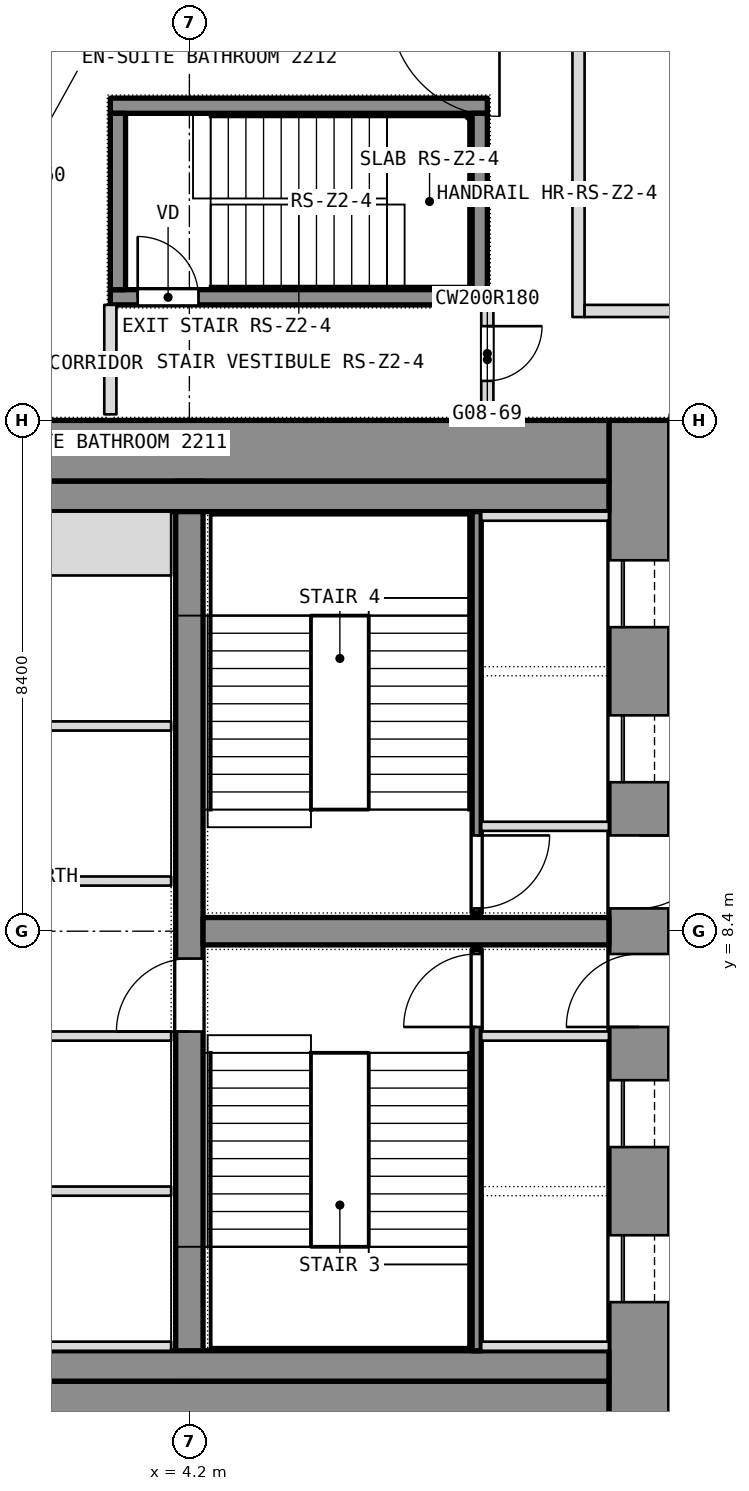
"""IFC4 building model, lengths in metres.
Left out: names, types, materials, properties, quantities, classifications, styles, units other than length and angle.
Written with IfcOpenShell. Run it as: python <this file> out.ifc"""

import sys

from ifc_helpers import new_model, si_unit, direction, frame, frame_2d, origin, place, context, subcontext, project, spatial, rectangle, extrude, element, fill, save


model = new_model("IFC4")
c1 = context("Model", 3, precision=1e-05, world=origin(), true_north=direction((0.0, 1.0)))
c2 = subcontext(c1, "Body", "Model", "MODEL_VIEW")
j1 = project(units=[si_unit("LENGTHUNIT", "METRE"), si_unit("PLANEANGLEUNIT", "RADIAN")], contexts=[c1])
p1 = place(None, origin())
s1 = spatial("IfcSite", under=j1, at=p1, CompositionType="ELEMENT")
p2 = place(p1, origin())
s2 = spatial("IfcBuilding", under=s1, at=p2, CompositionType="ELEMENT")
p3 = place(p2, frame((0.0, 0.0, 104.9)))
s3 = spatial("IfcBuildingStorey", under=s2, at=p3, CompositionType="ELEMENT", Elevation=104.9)
p4 = place(p3, frame((11.6, 0.0, 0.0), z_axis=(0.0, 0.0, 1.0), x_axis=(0.0, 1.0, 0.0)))
e1 = element("IfcWall", 1, at=p4, inside=s3, PredefinedType="SHEAR", context=c2, shape_type="SweptSolid", body=[
    extrude(rectangle(XDim=16.8, YDim=1.0, at=frame_2d((8.4, 0.0))), origin(), (0.0, 0.0, 1.0), 3.6),
])
p5 = place(p4, frame((2.3, 0.0, 0.0)))
e2 = element("IfcOpeningElement", 2, at=p5, cuts=e1, PredefinedType="OPENING", context=c2, shape_type="SweptSolid", body=[
    extrude(rectangle(XDim=1.1, YDim=2.1, at=frame_2d((0.55, 1.05))), frame((0.0, 0.5, 0.0), z_axis=(0.0, -1.0, 0.0), x_axis=(1.0, 0.0, 0.0)), (0.0, 0.0, 1.0), 1.0),
])
p6 = place(p4, frame((4.85, 0.0, 0.0)))
e3 = element("IfcOpeningElement", 3, at=p6, cuts=e1, PredefinedType="OPENING", context=c2, shape_type="SweptSolid", body=[
    extrude(rectangle(XDim=1.1, YDim=2.1, at=frame_2d((0.55, 1.05))), frame((0.0, 0.5, 0.0), z_axis=(0.0, -1.0, 0.0), x_axis=(1.0, 0.0, 0.0)), (0.0, 0.0, 1.0), 1.0),
])
p7 = place(p4, frame((6.825, 0.0, 0.0)))
e4 = element("IfcOpeningElement", 4, at=p7, cuts=e1, PredefinedType="OPENING", context=c2, shape_type="SweptSolid", body=[
    extrude(rectangle(XDim=1.2, YDim=2.1, at=frame_2d((0.6, 1.05))), frame((0.0, 0.5, 0.0), z_axis=(0.0, -1.0, 0.0), x_axis=(1.0, 0.0, 0.0)), (0.0, 0.0, 1.0), 1.0),
])
p8 = place(p4, frame((13.4, 0.0, 0.0)))
e5 = element("IfcOpeningElement", 5, at=p8, cuts=e1, PredefinedType="OPENING", context=c2, shape_type="SweptSolid", body=[
    extrude(rectangle(XDim=1.1, YDim=2.1, at=frame_2d((0.55, 1.05))), frame((0.0, 0.5, 0.0), z_axis=(0.0, -1.0, 0.0), x_axis=(1.0, 0.0, 0.0)), (0.0, 0.0, 1.0), 1.0),
])
p9 = place(p4, frame((10.85, 0.0, 0.0)))
e6 = element("IfcOpeningElement", 6, at=p9, cuts=e1, PredefinedType="OPENING", context=c2, shape_type="SweptSolid", body=[
    extrude(rectangle(XDim=1.1, YDim=2.1, at=frame_2d((0.55, 1.05))), frame((0.0, 0.5, 0.0), z_axis=(0.0, -1.0, 0.0), x_axis=(1.0, 0.0, 0.0)), (0.0, 0.0, 1.0), 1.0),
])
p10 = place(p4, frame((8.775, 0.0, 0.0)))
e7 = element("IfcOpeningElement", 7, at=p10, cuts=e1, PredefinedType="OPENING", context=c2, shape_type="SweptSolid", body=[
    extrude(rectangle(XDim=1.2, YDim=2.1, at=frame_2d((0.6, 1.05))), frame((0.0, 0.5, 0.0), z_axis=(0.0, -1.0, 0.0), x_axis=(1.0, 0.0, 0.0)), (0.0, 0.0, 1.0), 1.0),
])
for number, where, z_axis, x_axis in (
    (8, (-11.1, 0.5, 0.0), (0.0, 0.0, 1.0), (1.0, 0.0, 0.0)),
    (9, (-11.1, 16.3, 0.0), (0.0, 0.0, 1.0), (1.0, 0.0, 0.0)),
):
    element("IfcWall", number, at=place(p3, frame(where, z_axis=z_axis, x_axis=x_axis)), inside=s3, PredefinedType="SHEAR", context=c2, shape_type="SweptSolid", body=[
        extrude(rectangle(XDim=22.2, YDim=1.0, at=frame_2d((11.1, 0.0))), origin(), (0.0, 0.0, 1.0), 3.6),
    ])
p11 = place(p3, frame((4.2, 1.0, 0.0), z_axis=(0.0, 0.0, 1.0), x_axis=(0.0, 1.0, 0.0)))
e10 = element("IfcWall", 10, at=p11, inside=s3, PredefinedType="SHEAR", context=c2, shape_type="SweptSolid", body=[
    extrude(rectangle(XDim=14.8, YDim=0.45, at=frame_2d((7.4, 0.0))), origin(), (0.0, 0.0, 1.0), 3.6),
])
p12 = place(p11, frame((5.75, 0.0, 0.0)))
e11 = element("IfcOpeningElement", 11, at=p12, cuts=e10, PredefinedType="OPENING", context=c2, shape_type="SweptSolid", body=[
    extrude(rectangle(XDim=1.2, YDim=2.1, at=frame_2d((0.6, 1.05))), frame((0.0, 0.225, 0.0), z_axis=(0.0, -1.0, 0.0), x_axis=(1.0, 0.0, 0.0)), (0.0, 0.0, 1.0), 0.45),
])
p13 = place(p3, frame((4.425, 8.4, 0.0), z_axis=(0.0, 0.0, 1.0), x_axis=(1.0, 0.0, 0.0)))
e12 = element("IfcWall", 12, at=p13, inside=s3, PredefinedType="SHEAR", context=c2, shape_type="SweptSolid", body=[
    extrude(rectangle(XDim=6.675, YDim=0.45, at=frame_2d((3.337, 0.0))), origin(), (0.0, 0.0, 1.0), 3.6),
])
p14 = place(p3, frame((10.6, 18.5, 0.0), z_axis=(0.0, 0.0, 1.0), x_axis=(0.0, 1.0, 0.0)))
e13 = element("IfcWall", 13, at=p14, inside=s3, PredefinedType="PARTITIONING", context=c2, shape_type="SweptSolid", body=[
    extrude(rectangle(XDim=5.0, YDim=0.2, at=frame_2d((2.5, 0.0))), origin(), (0.0, 0.0, 1.0), 3.34),
])
p15 = place(p3, frame((9.1, 16.9, 0.0), z_axis=(0.0, 0.0, 1.0), x_axis=(0.0, 1.0, 0.0)))
e14 = element("IfcWall", 14, at=p15, inside=s3, PredefinedType="PARTITIONING", context=c2, shape_type="SweptSolid", body=[
    extrude(rectangle(XDim=1.8, YDim=0.2, at=frame_2d((0.9, 0.0))), origin(), (0.0, 0.0, 1.0), 3.34),
])
p16 = place(p15, frame((0.55, 0.0, 0.0)))
e15 = element("IfcOpeningElement", 15, at=p16, cuts=e14, PredefinedType="OPENING", context=c2, shape_type="SweptSolid", body=[
    extrude(rectangle(XDim=0.9, YDim=2.1, at=frame_2d((0.45, 1.05))), frame((0.0, 0.1, 0.0), z_axis=(0.0, -1.0, 0.0), x_axis=(1.0, 0.0, 0.0)), (0.0, 0.0, 1.0), 0.2),
])
p17 = place(p3, frame((2.9, 16.9, 0.0), z_axis=(0.0, 0.0, 1.0), x_axis=(0.0, 1.0, 0.0)))
e16 = element("IfcWall", 16, at=p17, inside=s3, PredefinedType="PARTITIONING", context=c2, shape_type="SweptSolid", body=[
    extrude(rectangle(XDim=1.8, YDim=0.2, at=frame_2d((0.9, 0.0))), origin(), (0.0, 0.0, 1.0), 3.34),
])
p18 = place(p3, frame((10.7, 18.6, 0.0), z_axis=(0.0, 0.0, 1.0), x_axis=(1.0, 0.0, 0.0)))
e17 = element("IfcWall", 17, at=p18, inside=s3, PredefinedType="PARTITIONING", context=c2, shape_type="SweptSolid", body=[
    extrude(rectangle(XDim=6.2, YDim=0.2, at=frame_2d((3.1, 0.0))), origin(), (0.0, 0.0, 1.0), 3.34),
])
p19 = place(p18, frame((2.3, 0.0, 0.0)))
e18 = element("IfcOpeningElement", 18, at=p19, cuts=e17, PredefinedType="OPENING", context=c2, shape_type="SweptSolid", body=[
    extrude(rectangle(XDim=1.0, YDim=2.1, at=frame_2d((0.5, 1.05))), frame((0.0, 0.1, 0.0), z_axis=(0.0, -1.0, 0.0), x_axis=(1.0, 0.0, 0.0)), (0.0, 0.0, 1.0), 0.2),
])
for number, where, z_axis, x_axis in (
    (19, (-11.1, 1.25, 0.0), (0.0, 0.0, 1.0), (1.0, 0.0, 0.0)),
    (20, (-11.1, 15.55, 0.0), (0.0, 0.0, 1.0), (1.0, 0.0, 0.0)),
):
    element("IfcWall", number, at=place(p3, frame(where, z_axis=z_axis, x_axis=x_axis)), inside=s3, PredefinedType="PARTITIONING", context=c2, shape_type="SweptSolid", body=[
        extrude(rectangle(XDim=22.2, YDim=0.5, at=frame_2d((11.1, 0.0))), origin(), (0.0, 0.0, 1.0), 3.34),
    ])
p20 = place(p3, frame((8.925, 1.5, 0.0), z_axis=(0.0, 0.0, 1.0), x_axis=(0.0, 1.0, 0.0)))
e21 = element("IfcWall", 21, at=p20, inside=s3, PredefinedType="SHEAR", context=c2, shape_type="SweptSolid", body=[
    extrude(rectangle(XDim=6.6, YDim=0.15, at=frame_2d((3.3, 0.0))), origin(), (0.0, 0.0, 1.0), 3.34),
])
p21 = place(p20, frame((5.325, 0.0, 0.0)))
e22 = element("IfcOpeningElement", 22, at=p21, cuts=e21, PredefinedType="OPENING", context=c2, shape_type="SweptSolid", body=[
    extrude(rectangle(XDim=1.2, YDim=2.1, at=frame_2d((0.6, 1.05))), frame((0.0, 0.075, 0.0), z_axis=(0.0, -1.0, 0.0), x_axis=(1.0, 0.0, 0.0)), (0.0, 0.0, 1.0), 0.15),
])
for number, where, z_axis, x_axis in (
    (23, (9.0, 6.675, 0.0), (0.0, 0.0, 1.0), (1.0, 0.0, 0.0)),
    (24, (9.0, 1.575, 0.0), (0.0, 0.0, 1.0), (1.0, 0.0, 0.0)),
):
    element("IfcWall", number, at=place(p3, frame(where, z_axis=z_axis, x_axis=x_axis)), inside=s3, PredefinedType="SHEAR", context=c2, shape_type="SweptSolid", body=[
        extrude(rectangle(XDim=2.1, YDim=0.15, at=frame_2d((1.05, 0.0))), origin(), (0.0, 0.0, 1.0), 3.6),
    ])
p22 = place(p3, frame((8.925, 8.7, 0.0), z_axis=(0.0, 0.0, 1.0), x_axis=(0.0, 1.0, 0.0)))
e25 = element("IfcWall", 25, at=p22, inside=s3, PredefinedType="SHEAR", context=c2, shape_type="SweptSolid", body=[
    extrude(rectangle(XDim=6.6, YDim=0.15, at=frame_2d((3.3, 0.0))), origin(), (0.0, 0.0, 1.0), 3.34),
])
p23 = place(p22, frame((0.075, 0.0, 0.0)))
e26 = element("IfcOpeningElement", 26, at=p23, cuts=e25, PredefinedType="OPENING", context=c2, shape_type="SweptSolid", body=[
    extrude(rectangle(XDim=1.2, YDim=2.1, at=frame_2d((0.6, 1.05))), frame((0.0, 0.075, 0.0), z_axis=(0.0, -1.0, 0.0), x_axis=(1.0, 0.0, 0.0)), (0.0, 0.0, 1.0), 0.15),
])
for number, where, z_axis, x_axis in (
    (27, (9.0, 10.125, 0.0), (0.0, 0.0, 1.0), (1.0, 0.0, 0.0)),
    (28, (9.0, 15.225, 0.0), (0.0, 0.0, 1.0), (1.0, 0.0, 0.0)),
):
    element("IfcWall", number, at=place(p3, frame(where, z_axis=z_axis, x_axis=x_axis)), inside=s3, PredefinedType="SHEAR", context=c2, shape_type="SweptSolid", body=[
        extrude(rectangle(XDim=2.1, YDim=0.15, at=frame_2d((1.05, 0.0))), origin(), (0.0, 0.0, 1.0), 3.6),
    ])
p24 = place(p3, frame((-3.9, 4.125, 0.0), z_axis=(0.0, 0.0, 1.0), x_axis=(1.0, 0.0, 0.0)))
e29 = element("IfcWall", 29, at=p24, inside=s3, PredefinedType="PARTITIONING", context=c2, shape_type="SweptSolid", body=[
    extrude(rectangle(XDim=7.8, YDim=0.15, at=frame_2d((3.9, 0.0))), origin(), (0.0, 0.0, 1.0), 3.34),
])
p25 = place(p24, frame((3.75, 0.0, 0.0)))
e30 = element("IfcOpeningElement", 30, at=p25, cuts=e29, PredefinedType="OPENING", context=c2, shape_type="SweptSolid", body=[
    extrude(rectangle(XDim=1.2, YDim=2.1, at=frame_2d((0.6, 1.05))), frame((0.0, 0.075, 0.0), z_axis=(0.0, -1.0, 0.0), x_axis=(1.0, 0.0, 0.0)), (0.0, 0.0, 1.0), 0.15),
])
p26 = place(p3, frame((-3.9, 11.775, 0.0), z_axis=(0.0, 0.0, 1.0), x_axis=(1.0, 0.0, 0.0)))
e31 = element("IfcWall", 31, at=p26, inside=s3, PredefinedType="PARTITIONING", context=c2, shape_type="SweptSolid", body=[
    extrude(rectangle(XDim=7.8, YDim=0.15, at=frame_2d((3.9, 0.0))), origin(), (0.0, 0.0, 1.0), 3.34),
])
p27 = place(p26, frame((3.3, 0.0, 0.0)))
e32 = element("IfcOpeningElement", 32, at=p27, cuts=e31, PredefinedType="OPENING", context=c2, shape_type="SweptSolid", body=[
    extrude(rectangle(XDim=1.2, YDim=2.1, at=frame_2d((0.6, 1.05))), frame((0.0, 0.075, 0.0), z_axis=(0.0, -1.0, 0.0), x_axis=(1.0, 0.0, 0.0)), (0.0, 0.0, 1.0), 0.15),
])
p28 = place(p3, frame((1.65, 1.575, 0.0), z_axis=(0.0, 0.0, 1.0), x_axis=(1.0, 0.0, 0.0)))
e33 = element("IfcWall", 33, at=p28, inside=s3, PredefinedType="SHEAR", context=c2, shape_type="SweptSolid", body=[
    extrude(rectangle(XDim=2.25, YDim=0.15, at=frame_2d((1.125, 0.0))), origin(), (0.0, 0.0, 1.0), 3.6),
])
p29 = place(p3, frame((1.65, 14.775, 0.0), z_axis=(0.0, 0.0, 1.0), x_axis=(1.0, 0.0, 0.0)))
e34 = element("IfcWall", 34, at=p29, inside=s3, PredefinedType="SHEAR", context=c2, shape_type="SweptSolid", body=[
    extrude(rectangle(XDim=2.25, YDim=1.05, at=frame_2d((1.125, 0.0))), origin(), (0.0, 0.0, 1.0), 3.6),
])
for number, where, z_axis, x_axis in (
    (35, (1.65, 6.675, 0.0), (0.0, 0.0, 1.0), (1.0, 0.0, 0.0)),
    (36, (1.65, 9.225, 0.0), (0.0, 0.0, 1.0), (1.0, 0.0, 0.0)),
):
    element("IfcWall", number, at=place(p3, frame(where, z_axis=z_axis, x_axis=x_axis)), inside=s3, PredefinedType="SHEAR", context=c2, shape_type="SweptSolid", body=[
        extrude(rectangle(XDim=2.25, YDim=0.15, at=frame_2d((1.125, 0.0))), origin(), (0.0, 0.0, 1.0), 3.6),
    ])
p30 = place(p3, frame((12.1, 16.8, 0.0), z_axis=(0.0, 0.0, 1.0), x_axis=(1.0, 0.0, 0.0)))
e37 = element("IfcWall", 37, at=p30, inside=s3, PredefinedType="PARTITIONING", context=c2, shape_type="SweptSolid", body=[
    extrude(rectangle(XDim=4.6, YDim=0.2, at=frame_2d((2.3, 0.0))), origin(), (0.0, 0.0, 1.0), 2.89),
])
p31 = place(p3, frame((2.9, 18.825, 0.1), z_axis=(0.0, 0.0, 1.0), x_axis=(1.0, 0.0, 0.0)))
e38 = element("IfcWall", 38, at=p31, inside=s3, PredefinedType="SHEAR", context=c2, shape_type="SweptSolid", body=[
    extrude(rectangle(XDim=6.2, YDim=0.25, at=frame_2d((3.1, 0.0))), origin(), (0.0, 0.0, 1.0), 3.6),
])
p32 = place(p31, frame((0.45, 0.0, 0.0)))
e39 = element("IfcOpeningElement", 39, at=p32, cuts=e38, PredefinedType="OPENING", context=c2, shape_type="SweptSolid", body=[
    extrude(rectangle(XDim=1.0, YDim=2.1, at=frame_2d((0.5, 1.05))), frame((0.0, 0.125, 0.0), z_axis=(0.0, -1.0, 0.0), x_axis=(1.0, 0.0, 0.0)), (0.0, 0.0, 1.0), 0.25),
])
p33 = place(p3, frame((2.9, 21.975, 0.1), z_axis=(0.0, 0.0, 1.0), x_axis=(1.0, 0.0, 0.0)))
e40 = element("IfcWall", 40, at=p33, inside=s3, PredefinedType="SHEAR", context=c2, shape_type="SweptSolid", body=[
    extrude(rectangle(XDim=6.2, YDim=0.25, at=frame_2d((3.1, 0.0))), origin(), (0.0, 0.0, 1.0), 3.6),
])
for number, where, z_axis, x_axis in (
    (41, (3.025, 18.95, 0.1), (0.0, 0.0, 1.0), (0.0, 1.0, 0.0)),
    (42, (8.975, 18.95, 0.1), (0.0, 0.0, 1.0), (0.0, 1.0, 0.0)),
):
    element("IfcWall", number, at=place(p3, frame(where, z_axis=z_axis, x_axis=x_axis)), inside=s3, PredefinedType="SHEAR", context=c2, shape_type="SweptSolid", body=[
        extrude(rectangle(XDim=2.9, YDim=0.25, at=frame_2d((1.45, 0.0))), origin(), (0.0, 0.0, 1.0), 3.6),
    ])
p34 = place(p16, origin())
e43 = element("IfcDoor", 43, at=p34, inside=s3, OperationType="SINGLE_SWING_RIGHT", PredefinedType="DOOR", context=c2, shape_type="SweptSolid", body=[
    extrude(rectangle(XDim=0.9, YDim=2.1, at=frame_2d((0.45, 1.05))), frame((0.0, 0.025, 0.0), z_axis=(0.0, -1.0, 0.0), x_axis=(1.0, 0.0, 0.0)), (0.0, 0.0, 1.0), 0.05),
])
fill(e15, e43)
p35 = place(p32, origin())
e44 = element("IfcDoor", 44, at=p35, inside=s3, OperationType="SINGLE_SWING_LEFT", PredefinedType="DOOR", context=c2, shape_type="SweptSolid", body=[
    extrude(rectangle(XDim=1.0, YDim=2.1, at=frame_2d((0.5, 1.05))), frame((0.0, 0.025, 0.0), z_axis=(0.0, -1.0, 0.0), x_axis=(1.0, 0.0, 0.0)), (0.0, 0.0, 1.0), 0.05),
])
fill(e39, e44)
p36 = place(p5, origin())
e45 = element("IfcDoor", 45, at=p36, inside=s3, OperationType="SLIDING_TO_LEFT", PredefinedType="DOOR", context=c2, shape_type="SweptSolid", body=[
    extrude(rectangle(XDim=1.1, YDim=2.1, at=frame_2d((0.55, 1.05))), frame((0.0, 0.025, 0.0), z_axis=(0.0, -1.0, 0.0), x_axis=(1.0, 0.0, 0.0)), (0.0, 0.0, 1.0), 0.05),
])
fill(e2, e45)
p37 = place(p6, origin())
e46 = element("IfcDoor", 46, at=p37, inside=s3, OperationType="SLIDING_TO_LEFT", PredefinedType="DOOR", context=c2, shape_type="SweptSolid", body=[
    extrude(rectangle(XDim=1.1, YDim=2.1, at=frame_2d((0.55, 1.05))), frame((0.0, 0.025, 0.0), z_axis=(0.0, -1.0, 0.0), x_axis=(1.0, 0.0, 0.0)), (0.0, 0.0, 1.0), 0.05),
])
fill(e3, e46)
p38 = place(p7, origin())
e47 = element("IfcDoor", 47, at=p38, inside=s3, OperationType="SINGLE_SWING_LEFT", PredefinedType="DOOR", context=c2, shape_type="SweptSolid", body=[
    extrude(rectangle(XDim=1.2, YDim=2.1, at=frame_2d((0.6, 1.05))), frame((0.0, 0.025, 0.0), z_axis=(0.0, -1.0, 0.0), x_axis=(1.0, 0.0, 0.0)), (0.0, 0.0, 1.0), 0.05),
])
fill(e4, e47)
p39 = place(p21, origin())
e48 = element("IfcDoor", 48, at=p39, inside=s3, OperationType="SINGLE_SWING_LEFT", PredefinedType="DOOR", context=c2, shape_type="SweptSolid", body=[
    extrude(rectangle(XDim=1.2, YDim=2.1, at=frame_2d((0.6, 1.05))), frame((0.0, 0.025, 0.0), z_axis=(0.0, -1.0, 0.0), x_axis=(1.0, 0.0, 0.0)), (0.0, 0.0, 1.0), 0.05),
])
fill(e22, e48)
p40 = place(p8, origin())
e49 = element("IfcDoor", 49, at=p40, inside=s3, OperationType="SLIDING_TO_LEFT", PredefinedType="DOOR", context=c2, shape_type="SweptSolid", body=[
    extrude(rectangle(XDim=1.1, YDim=2.1, at=frame_2d((0.55, 1.05))), frame((0.0, 0.025, 0.0), z_axis=(0.0, -1.0, 0.0), x_axis=(1.0, 0.0, 0.0)), (0.0, 0.0, 1.0), 0.05),
])
fill(e5, e49)
p41 = place(p9, origin())
e50 = element("IfcDoor", 50, at=p41, inside=s3, OperationType="SLIDING_TO_LEFT", PredefinedType="DOOR", context=c2, shape_type="SweptSolid", body=[
    extrude(rectangle(XDim=1.1, YDim=2.1, at=frame_2d((0.55, 1.05))), frame((0.0, 0.025, 0.0), z_axis=(0.0, -1.0, 0.0), x_axis=(1.0, 0.0, 0.0)), (0.0, 0.0, 1.0), 0.05),
])
fill(e6, e50)
p42 = place(p10, origin())
e51 = element("IfcDoor", 51, at=p42, inside=s3, OperationType="SINGLE_SWING_LEFT", PredefinedType="DOOR", context=c2, shape_type="SweptSolid", body=[
    extrude(rectangle(XDim=1.2, YDim=2.1, at=frame_2d((0.6, 1.05))), frame((0.0, 0.025, 0.0), z_axis=(0.0, -1.0, 0.0), x_axis=(1.0, 0.0, 0.0)), (0.0, 0.0, 1.0), 0.05),
])
fill(e7, e51)
p43 = place(p23, origin())
e52 = element("IfcDoor", 52, at=p43, inside=s3, OperationType="SINGLE_SWING_LEFT", PredefinedType="DOOR", context=c2, shape_type="SweptSolid", body=[
    extrude(rectangle(XDim=1.2, YDim=2.1, at=frame_2d((0.6, 1.05))), frame((0.0, 0.025, 0.0), z_axis=(0.0, -1.0, 0.0), x_axis=(1.0, 0.0, 0.0)), (0.0, 0.0, 1.0), 0.05),
])
fill(e26, e52)
p44 = place(p12, origin())
e53 = element("IfcDoor", 53, at=p44, inside=s3, OperationType="SINGLE_SWING_LEFT", PredefinedType="DOOR", context=c2, shape_type="SweptSolid", body=[
    extrude(rectangle(XDim=1.2, YDim=2.1, at=frame_2d((0.6, 1.05))), frame((0.0, 0.025, 0.0), z_axis=(0.0, -1.0, 0.0), x_axis=(1.0, 0.0, 0.0)), (0.0, 0.0, 1.0), 0.05),
])
fill(e11, e53)
save(model, sys.argv[1])
